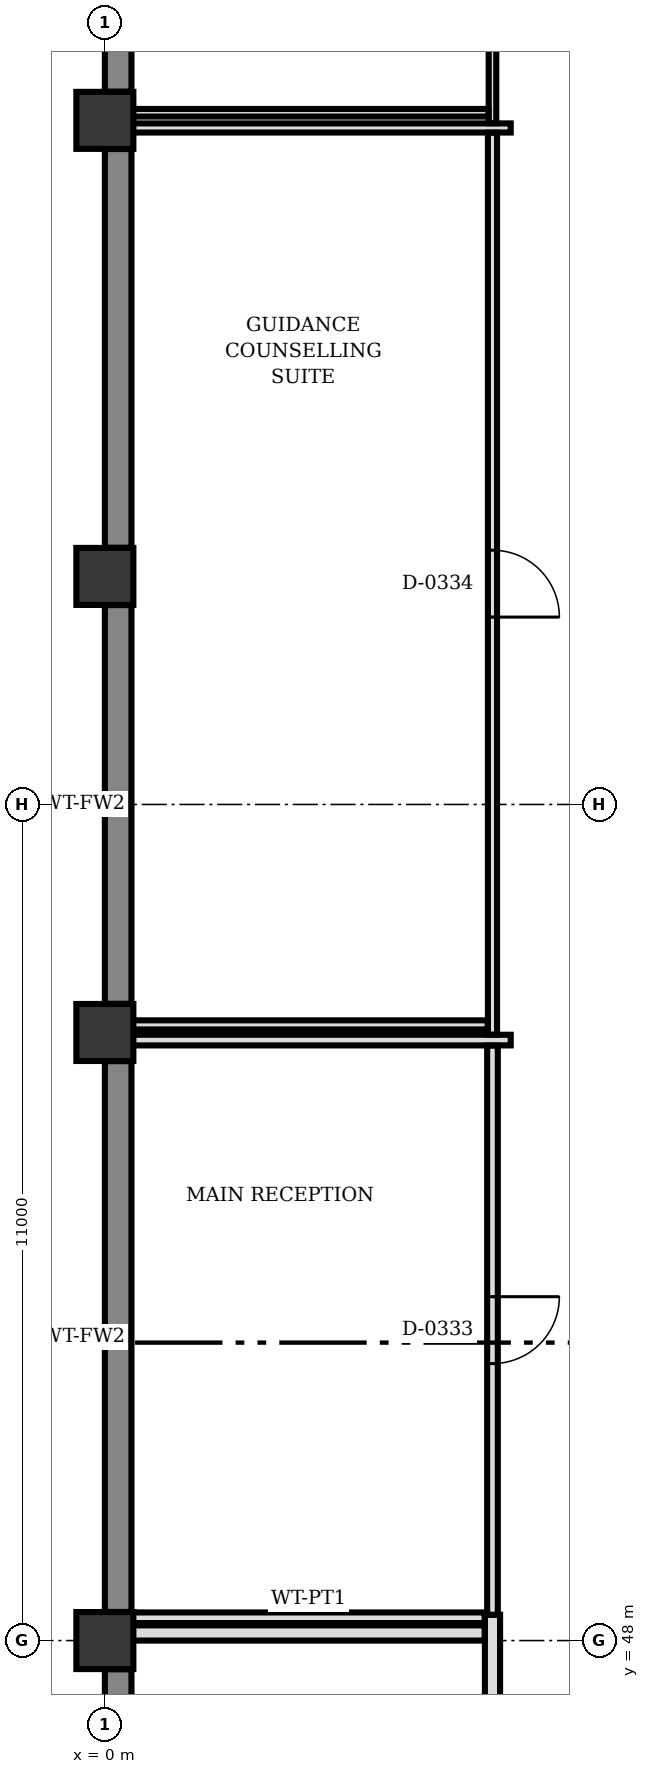
"""IFC4 building model, lengths in metres.
Left out: names, types, materials, properties, quantities, classifications, styles, units other than length and angle.
Written with IfcOpenShell. Run it as: python <this file> out.ifc"""

import sys

from ifc_helpers import new_model, si_unit, direction, frame, frame_2d, origin, origin_2d, place, context, subcontext, project, spatial, rectangle, extrude, element, fill, save


model = new_model("IFC4")
c1 = context("Model", 3, precision=1e-05, world=origin(), true_north=direction((0.0, 1.0)))
c2 = subcontext(c1, "Body", "Model", "MODEL_VIEW")
j1 = project(units=[si_unit("LENGTHUNIT", "METRE"), si_unit("PLANEANGLEUNIT", "RADIAN")], contexts=[c1])
p1 = place(None, origin())
s1 = spatial("IfcSite", under=j1, at=p1, CompositionType="ELEMENT")
p2 = place(p1, origin())
s2 = spatial("IfcBuilding", under=s1, at=p2, CompositionType="ELEMENT")
p3 = place(p2, origin())
s3 = spatial("IfcBuildingStorey", under=s2, at=p3, CompositionType="ELEMENT", Elevation=0.0)
for number, where, z_axis, x_axis in (
    (1, (0.0, 48.0, 0.0), (0.0, 0.0, 1.0), (1.0, 0.0, 0.0)),
    (2, (0.0, 56.0, 0.0), (0.0, 0.0, 1.0), (1.0, 0.0, 0.0)),
    (3, (0.0, 62.0, 0.0), (0.0, 0.0, 1.0), (1.0, 0.0, 0.0)),
    (4, (0.0, 68.0, 0.0), (0.0, 0.0, 1.0), (1.0, 0.0, 0.0)),
):
    element("IfcColumn", number, at=place(p3, frame(where, z_axis=z_axis, x_axis=x_axis)), inside=s3, PredefinedType="COLUMN", context=c2, shape_type="SweptSolid", body=[
        extrude(rectangle(XDim=0.75, YDim=0.75, at=origin_2d()), origin(), (0.0, 0.0, 1.0), 4.5),
    ])
for number, where, z_axis, x_axis in (
    (5, (0.175, 40.377, 0.0), (0.0, 0.0, 1.0), (0.0, 1.0, 0.0)),
    (6, (0.175, 48.377, 0.0), (0.0, 0.0, 1.0), (0.0, 1.0, 0.0)),
):
    element("IfcWall", number, at=place(p3, frame(where, z_axis=z_axis, x_axis=x_axis)), inside=s3, PredefinedType="SHEAR", context=c2, shape_type="SweptSolid", body=[
        extrude(rectangle(XDim=7.246, YDim=0.35, at=frame_2d((3.623, 0.0))), origin(), (0.0, 0.0, 1.0), 4.2),
    ])
for number, where, z_axis, x_axis in (
    (7, (0.175, 56.377, 0.0), (0.0, 0.0, 1.0), (0.0, 1.0, 0.0)),
    (8, (0.175, 62.377, 0.0), (0.0, 0.0, 1.0), (0.0, 1.0, 0.0)),
):
    element("IfcWall", number, at=place(p3, frame(where, z_axis=z_axis, x_axis=x_axis)), inside=s3, PredefinedType="SHEAR", context=c2, shape_type="SweptSolid", body=[
        extrude(rectangle(XDim=5.246, YDim=0.35, at=frame_2d((2.623, 0.0))), origin(), (0.0, 0.0, 1.0), 4.2),
    ])
p4 = place(p3, frame((0.175, 68.377, 0.0), z_axis=(0.0, 0.0, 1.0), x_axis=(0.0, 1.0, 0.0)))
e9 = element("IfcWall", 9, at=p4, inside=s3, PredefinedType="SHEAR", context=c2, shape_type="SweptSolid", body=[
    extrude(rectangle(XDim=7.246, YDim=0.35, at=frame_2d((3.623, 0.0))), origin(), (0.0, 0.0, 1.0), 4.2),
])
p5 = place(p3, frame((5.1, 48.34, 0.0), z_axis=(0.0, 0.0, 1.0), x_axis=(0.0, -1.0, 0.0)))
e10 = element("IfcWall", 10, at=p5, inside=s3, PredefinedType="PARTITIONING", context=c2, shape_type="SweptSolid", body=[
    extrude(rectangle(XDim=8.197, YDim=0.2, at=frame_2d((4.099, 0.0))), origin(), (0.0, 0.0, 1.0), 3.382),
])
p6 = place(p5, frame((3.374, 0.0, 0.0)))
e11 = element("IfcOpeningElement", 11, at=p6, cuts=e10, PredefinedType="OPENING", context=c2, shape_type="SweptSolid", body=[
    extrude(rectangle(XDim=1.45, YDim=2.2, at=frame_2d((0.725, 1.1))), frame((0.0, 0.11, 0.0), z_axis=(0.0, -1.0, 0.0), x_axis=(1.0, 0.0, 0.0)), (0.0, 0.0, 1.0), 0.22),
])
p7 = place(p3, frame((0.367, 48.1, 0.0), z_axis=(0.0, 0.0, 1.0), x_axis=(1.0, 0.0, 0.0)))
e12 = element("IfcWall", 12, at=p7, inside=s3, PredefinedType="PARTITIONING", context=c2, shape_type="SweptSolid", body=[
    extrude(rectangle(XDim=4.63, YDim=0.2, at=frame_2d((2.315, 0.0))), origin(), (0.0, 0.0, 1.0), 3.382),
])
p8 = place(p3, frame((0.367, 55.9, 0.0), z_axis=(0.0, 0.0, 1.0), x_axis=(1.0, 0.0, 0.0)))
e13 = element("IfcWall", 13, at=p8, inside=s3, PredefinedType="PARTITIONING", context=c2, shape_type="SweptSolid", body=[
    extrude(rectangle(XDim=4.973, YDim=0.14, at=frame_2d((2.487, 0.0))), origin(), (0.0, 0.0, 1.0), 4.2),
])
p9 = place(p3, frame((5.1, 55.827, 0.0), z_axis=(0.0, 0.0, 1.0), x_axis=(0.0, -1.0, 0.0)))
e14 = element("IfcWall", 14, at=p9, inside=s3, PredefinedType="PARTITIONING", context=c2, shape_type="SweptSolid", body=[
    extrude(rectangle(XDim=7.487, YDim=0.14, at=frame_2d((3.743, 0.0))), origin(), (0.0, 0.0, 1.0), 3.382),
])
p10 = place(p9, frame((3.303, 0.0, 0.0)))
e15 = element("IfcOpeningElement", 15, at=p10, cuts=e14, PredefinedType="OPENING", context=c2, shape_type="SweptSolid", body=[
    extrude(rectangle(XDim=0.88, YDim=2.1, at=frame_2d((0.44, 1.05))), frame((0.0, 0.08, 0.0), z_axis=(0.0, -1.0, 0.0), x_axis=(1.0, 0.0, 0.0)), (0.0, 0.0, 1.0), 0.16),
])
p11 = place(p3, frame((4.997, 48.3, 0.0), z_axis=(0.0, 0.0, 1.0), x_axis=(-1.0, 0.0, 0.0)))
e16 = element("IfcWall", 16, at=p11, inside=s3, PredefinedType="PARTITIONING", context=c2, shape_type="SweptSolid", body=[
    extrude(rectangle(XDim=4.63, YDim=0.14, at=frame_2d((2.315, 0.0))), origin(), (0.0, 0.0, 1.0), 3.382),
])
p12 = place(p3, frame((0.367, 67.9, 0.0), z_axis=(0.0, 0.0, 1.0), x_axis=(1.0, 0.0, 0.0)))
e17 = element("IfcWall", 17, at=p12, inside=s3, PredefinedType="PARTITIONING", context=c2, shape_type="SweptSolid", body=[
    extrude(rectangle(XDim=4.973, YDim=0.12, at=frame_2d((2.487, 0.0))), origin(), (0.0, 0.0, 1.0), 3.382),
])
p13 = place(p3, frame((5.1, 67.837, 0.0), z_axis=(0.0, 0.0, 1.0), x_axis=(0.0, -1.0, 0.0)))
e18 = element("IfcWall", 18, at=p13, inside=s3, PredefinedType="PARTITIONING", context=c2, shape_type="SweptSolid", body=[
    extrude(rectangle(XDim=11.864, YDim=0.12, at=frame_2d((5.932, 0.0))), origin(), (0.0, 0.0, 1.0), 3.382),
])
p14 = place(p13, frame((5.492, 0.0, 0.0)))
e19 = element("IfcOpeningElement", 19, at=p14, cuts=e18, PredefinedType="OPENING", context=c2, shape_type="SweptSolid", body=[
    extrude(rectangle(XDim=0.88, YDim=2.1, at=frame_2d((0.44, 1.05))), frame((0.0, 0.07, 0.0), z_axis=(0.0, -1.0, 0.0), x_axis=(1.0, 0.0, 0.0)), (0.0, 0.0, 1.0), 0.14),
])
p15 = place(p3, frame((5.037, 56.1, 0.0), z_axis=(0.0, 0.0, 1.0), x_axis=(-1.0, 0.0, 0.0)))
e20 = element("IfcWall", 20, at=p15, inside=s3, PredefinedType="PARTITIONING", context=c2, shape_type="SweptSolid", body=[
    extrude(rectangle(XDim=4.67, YDim=0.12, at=frame_2d((2.335, 0.0))), origin(), (0.0, 0.0, 1.0), 4.2),
])
p16 = place(p3, frame((5.1, 75.857, 0.0), z_axis=(0.0, 0.0, 1.0), x_axis=(0.0, -1.0, 0.0)))
e21 = element("IfcWall", 21, at=p16, inside=s3, PredefinedType="PARTITIONING", context=c2, shape_type="SweptSolid", body=[
    extrude(rectangle(XDim=7.894, YDim=0.1, at=frame_2d((3.947, 0.0))), origin(), (0.0, 0.0, 1.0), 3.382),
])
p17 = place(p16, frame((3.397, 0.0, 0.0)))
e22 = element("IfcOpeningElement", 22, at=p17, cuts=e21, PredefinedType="OPENING", context=c2, shape_type="SweptSolid", body=[
    extrude(rectangle(XDim=1.1, YDim=2.28, at=frame_2d((0.55, 1.14))), frame((0.0, 0.06, 0.0), z_axis=(0.0, -1.0, 0.0), x_axis=(1.0, 0.0, 0.0)), (0.0, 0.0, 1.0), 0.12),
])
p18 = place(p3, frame((5.047, 68.1, 0.0), z_axis=(0.0, 0.0, 1.0), x_axis=(-1.0, 0.0, 0.0)))
e23 = element("IfcWall", 23, at=p18, inside=s3, PredefinedType="PARTITIONING", context=c2, shape_type="SweptSolid", body=[
    extrude(rectangle(XDim=4.68, YDim=0.1, at=frame_2d((2.34, 0.0))), origin(), (0.0, 0.0, 1.0), 3.382),
])
p19 = place(p10, origin())
e24 = element("IfcDoor", 24, at=p19, inside=s3, OperationType="SINGLE_SWING_LEFT", PredefinedType="DOOR", context=c2, shape_type="SweptSolid", body=[
    extrude(rectangle(XDim=0.88, YDim=2.1, at=frame_2d((0.44, 1.05))), frame((0.0, 0.025, 0.0), z_axis=(0.0, -1.0, 0.0), x_axis=(1.0, 0.0, 0.0)), (0.0, 0.0, 1.0), 0.05),
])
fill(e15, e24)
p20 = place(p14, origin())
e25 = element("IfcDoor", 25, at=p20, inside=s3, OperationType="SINGLE_SWING_RIGHT", PredefinedType="DOOR", context=c2, shape_type="SweptSolid", body=[
    extrude(rectangle(XDim=0.88, YDim=2.1, at=frame_2d((0.44, 1.05))), frame((0.0, 0.025, 0.0), z_axis=(0.0, -1.0, 0.0), x_axis=(1.0, 0.0, 0.0)), (0.0, 0.0, 1.0), 0.05),
])
fill(e19, e25)
save(model, sys.argv[1])
